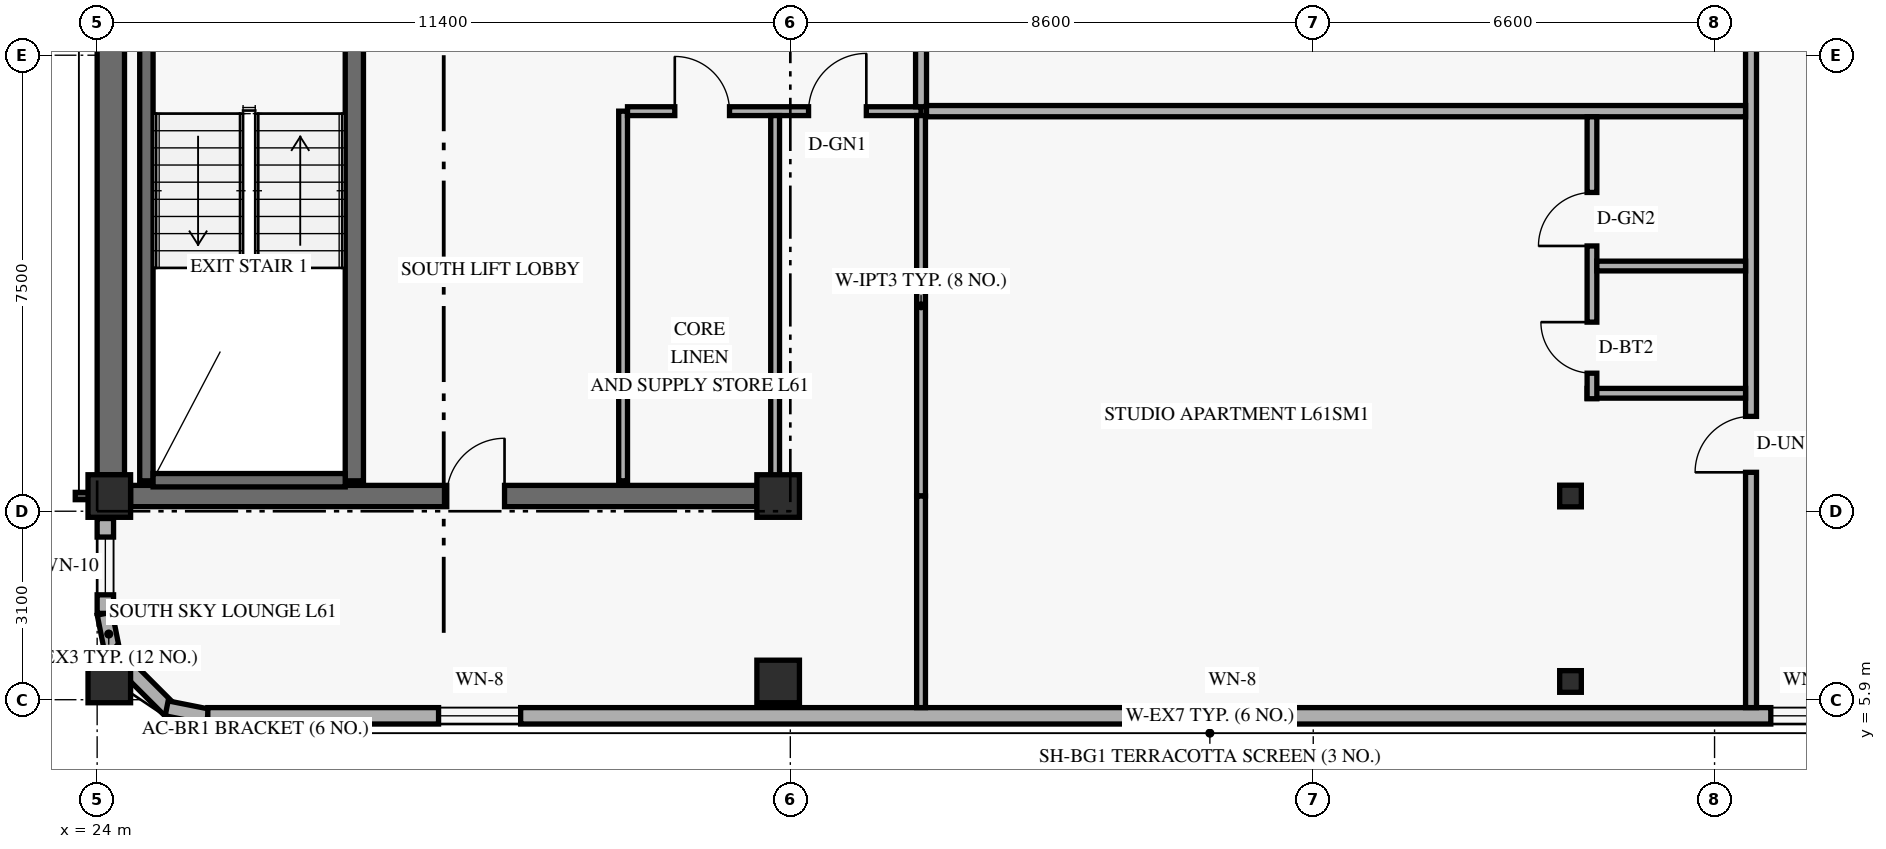
"""IFC4 building model, lengths in metres.
Left out: names, types, materials, properties, quantities, classifications, styles, units other than length and angle.
Written with IfcOpenShell. Run it as: python <this file> out.ifc"""

import sys

from ifc_helpers import new_model, si_unit, direction, frame, frame_2d, origin, origin_2d, place, context, subcontext, project, spatial, rectangle, hollow_rectangle, extrude, element, fill, save


model = new_model("IFC4")
c1 = context("Model", 3, precision=1e-05, world=origin(), true_north=direction((0.0, 1.0)))
c2 = subcontext(c1, "Body", "Model", "MODEL_VIEW")
j1 = project(units=[si_unit("LENGTHUNIT", "METRE"), si_unit("PLANEANGLEUNIT", "RADIAN")], contexts=[c1])
p1 = place(None, origin())
s1 = spatial("IfcSite", under=j1, at=p1, CompositionType="ELEMENT")
p2 = place(p1, origin())
s2 = spatial("IfcBuilding", under=s1, at=p2, CompositionType="ELEMENT")
p3 = place(p2, frame((0.0, 0.0, 235.2)))
s3 = spatial("IfcBuildingStorey", under=s2, at=p3, CompositionType="ELEMENT", Elevation=235.2)
p4 = place(p3, frame((24.225, 9.6, 0.0), z_axis=(0.0, 0.0, 1.0), x_axis=(0.0, 1.0, 0.0)))
e1 = element("IfcWall", 1, at=p4, inside=s3, PredefinedType="SHEAR", context=c2, shape_type="SweptSolid", body=[
    extrude(rectangle(XDim=7.6, YDim=0.45, at=frame_2d((3.8, 0.0))), origin(), (0.0, 0.0, 1.0), 2.821),
])
p5 = place(p3, frame((24.55, 9.25, 0.0), z_axis=(0.0, 0.0, 1.0), x_axis=(1.0, 0.0, 0.0)))
e2 = element("IfcWall", 2, at=p5, inside=s3, PredefinedType="SHEAR", context=c2, shape_type="SweptSolid", body=[
    extrude(rectangle(XDim=10.3, YDim=0.35, at=frame_2d((5.15, 0.0))), origin(), (0.0, 0.0, 1.0), 3.36),
])
p6 = place(p5, frame((5.2, 0.0, 0.0)))
e3 = element("IfcOpeningElement", 3, at=p6, cuts=e2, PredefinedType="OPENING", context=c2, shape_type="SweptSolid", body=[
    extrude(rectangle(XDim=0.95, YDim=2.15, at=frame_2d((0.475, 1.075))), frame((0.0, 0.185, 0.0), z_axis=(0.0, -1.0, 0.0), x_axis=(1.0, 0.0, 0.0)), (0.0, 0.0, 1.0), 0.37),
])
p7 = place(p3, frame((24.81, 9.5, 0.0), z_axis=(0.0, 0.0, 1.0), x_axis=(0.0, 1.0, 0.0)))
e4 = element("IfcWall", 4, at=p7, inside=s3, PredefinedType="SHEAR", context=c2, shape_type="SweptSolid", body=[
    extrude(rectangle(XDim=7.76, YDim=0.22, at=frame_2d((3.88, 0.0))), origin(), (0.0, 0.0, 1.0), 3.36),
])
p8 = place(p3, frame((28.23, 9.5, 0.0), z_axis=(0.0, 0.0, 1.0), x_axis=(0.0, 1.0, 0.0)))
e5 = element("IfcWall", 5, at=p8, inside=s3, PredefinedType="SHEAR", context=c2, shape_type="SweptSolid", body=[
    extrude(rectangle(XDim=7.76, YDim=0.3, at=frame_2d((3.88, 0.0))), origin(), (0.0, 0.0, 1.0), 3.36),
])
p9 = place(p3, frame((24.92, 9.51, 0.0), z_axis=(0.0, 0.0, 1.0), x_axis=(1.0, 0.0, 0.0)))
e6 = element("IfcWall", 6, at=p9, inside=s3, PredefinedType="SHEAR", context=c2, shape_type="SweptSolid", body=[
    extrude(rectangle(XDim=3.16, YDim=0.22, at=frame_2d((1.58, 0.0))), origin(), (0.0, 0.0, 1.0), 3.36),
])
for number, where, z_axis, x_axis in (
    (7, (24.2, 6.2, 0.0), (0.0, 0.0, 1.0), (1.0, 0.0, 0.0)),
    (8, (24.2, 9.25, 0.0), (0.0, 0.0, 1.0), (1.0, 0.0, 0.0)),
    (9, (35.2, 6.2, 0.0), (0.0, 0.0, 1.0), (1.0, 0.0, 0.0)),
    (10, (35.2, 9.25, 0.0), (0.0, 0.0, 1.0), (1.0, 0.0, 0.0)),
):
    element("IfcColumn", number, at=place(p3, frame(where, z_axis=z_axis, x_axis=x_axis)), inside=s3, PredefinedType="COLUMN", context=c2, shape_type="SweptSolid", body=[
        extrude(rectangle(XDim=0.7, YDim=0.7, at=origin_2d()), origin(), (0.0, 0.0, 1.0), 3.6),
    ])
for number, where, z_axis, x_axis in (
    (11, (48.168, 6.2, 0.0), (0.035, 0.0, 0.999), (0.0, 1.0, 0.0)),
    (12, (48.168, 9.25, 0.0), (0.035, 0.0, 0.999), (0.0, 1.0, 0.0)),
):
    element("IfcColumn", number, at=place(p3, frame(where, z_axis=z_axis, x_axis=x_axis)), inside=s3, PredefinedType="COLUMN", context=c2, shape_type="SweptSolid", body=[
        extrude(hollow_rectangle(XDim=0.356, YDim=0.356, WallThickness=0.016, at=origin_2d()), origin(), (0.0, 0.0, 1.0), 3.602),
    ])
p10 = place(p3, frame((24.124, 7.316, 0.0), z_axis=(0.0, 0.0, 1.0), x_axis=(0.194952956674, -0.980812594069, 0.0)))
e13 = element("IfcWall", 13, at=p10, inside=s3, PredefinedType="SOLIDWALL", context=c2, shape_type="SweptSolid", body=[
    extrude(rectangle(XDim=0.686, YDim=0.25, at=frame_2d((0.343, 0.0))), origin(), (0.0, 0.0, 1.0), 2.803),
])
p11 = place(p3, frame((24.231, 6.694, 0.0), z_axis=(0.0, 0.0, 1.0), x_axis=(0.707106781187, -0.707106781187, 0.0)))
e14 = element("IfcWall", 14, at=p11, inside=s3, PredefinedType="SOLIDWALL", context=c2, shape_type="SweptSolid", body=[
    extrude(rectangle(XDim=1.362, YDim=0.25, at=frame_2d((0.681, 0.0))), origin(), (0.0, 0.0, 1.0), 2.803),
])
p12 = place(p3, frame((25.143, 5.758, 0.0), z_axis=(0.0, 0.0, 1.0), x_axis=(0.980812594069, -0.194952956674, 0.0)))
e15 = element("IfcWall", 15, at=p12, inside=s3, PredefinedType="SOLIDWALL", context=c2, shape_type="SweptSolid", body=[
    extrude(rectangle(XDim=0.686, YDim=0.25, at=frame_2d((0.343, 0.0))), origin(), (0.0, 0.0, 1.0), 3.36),
])
p13 = place(p3, frame((25.82, 5.635, 0.0), z_axis=(0.0, 0.0, 1.0), x_axis=(1.0, 0.0, 0.0)))
e16 = element("IfcWall", 16, at=p13, inside=s3, PredefinedType="SOLIDWALL", context=c2, shape_type="SweptSolid", body=[
    extrude(rectangle(XDim=32.96, YDim=0.27, at=frame_2d((16.48, 0.0))), origin(), (0.0, 0.0, 1.0), 3.36),
])
p14 = place(p13, frame((3.795, 0.0, 0.85)))
e17 = element("IfcOpeningElement", 17, at=p14, cuts=e16, PredefinedType="OPENING", context=c2, shape_type="SweptSolid", body=[
    extrude(rectangle(XDim=1.35, YDim=1.55, at=frame_2d((0.675, 0.775))), frame((0.0, 0.145, 0.0), z_axis=(0.0, -1.0, 0.0), x_axis=(1.0, 0.0, 0.0)), (0.0, 0.0, 1.0), 0.29),
])
p15 = place(p13, frame((16.176, 0.0, 0.85)))
e18 = element("IfcOpeningElement", 18, at=p15, cuts=e16, PredefinedType="OPENING", context=c2, shape_type="SweptSolid", body=[
    extrude(rectangle(XDim=1.35, YDim=1.55, at=frame_2d((0.675, 0.775))), frame((0.0, 0.145, 0.0), z_axis=(0.0, -1.0, 0.0), x_axis=(1.0, 0.0, 0.0)), (0.0, 0.0, 1.0), 0.29),
])
p16 = place(p13, frame((25.705, 0.0, 0.85)))
e19 = element("IfcOpeningElement", 19, at=p16, cuts=e16, PredefinedType="OPENING", context=c2, shape_type="SweptSolid", body=[
    extrude(rectangle(XDim=1.2, YDim=1.5, at=frame_2d((0.6, 0.75))), frame((0.0, 0.145, 0.0), z_axis=(0.0, -1.0, 0.0), x_axis=(1.0, 0.0, 0.0)), (0.0, 0.0, 1.0), 0.29),
])
p17 = place(p13, frame((28.011, 0.0, 0.85)))
e20 = element("IfcOpeningElement", 20, at=p17, cuts=e16, PredefinedType="OPENING", context=c2, shape_type="SweptSolid", body=[
    extrude(rectangle(XDim=1.35, YDim=1.55, at=frame_2d((0.675, 0.775))), frame((0.0, 0.145, 0.0), z_axis=(0.0, -1.0, 0.0), x_axis=(1.0, 0.0, 0.0)), (0.0, 0.0, 1.0), 0.29),
])
p18 = place(p3, frame((24.135, 7.32, 0.0), z_axis=(0.0, 0.0, 1.0), x_axis=(0.0, 1.0, 0.0)))
e21 = element("IfcWall", 21, at=p18, inside=s3, PredefinedType="SOLIDWALL", context=c2, shape_type="SweptSolid", body=[
    extrude(rectangle(XDim=1.56, YDim=0.27, at=frame_2d((0.78, 0.0))), origin(), (0.0, 0.0, 1.0), 2.803),
])
p19 = place(p18, frame((0.305, 0.0, 0.85)))
e22 = element("IfcOpeningElement", 22, at=p19, cuts=e21, PredefinedType="OPENING", context=c2, shape_type="SweptSolid", body=[
    extrude(rectangle(XDim=0.95, YDim=1.5, at=frame_2d((0.475, 0.75))), frame((0.0, 0.145, 0.0), z_axis=(0.0, -1.0, 0.0), x_axis=(1.0, 0.0, 0.0)), (0.0, 0.0, 1.0), 0.29),
])
p20 = place(p3, frame((32.65, 9.5, 0.0), z_axis=(0.0, 0.0, 1.0), x_axis=(0.0, 1.0, 0.0)))
e23 = element("IfcWall", 23, at=p20, inside=s3, PredefinedType="PARTITIONING", context=c2, shape_type="SweptSolid", body=[
    extrude(rectangle(XDim=6.08, YDim=0.145, at=frame_2d((3.04, 0.0))), origin(), (0.0, 0.0, 1.0), 3.36),
])
p21 = place(p3, frame((32.722, 15.58, 0.0), z_axis=(0.0, 0.0, 1.0), x_axis=(1.0, 0.0, 0.0)))
e24 = element("IfcWall", 24, at=p21, inside=s3, PredefinedType="PARTITIONING", context=c2, shape_type="SweptSolid", body=[
    extrude(rectangle(XDim=4.828, YDim=0.145, at=frame_2d((2.414, 0.0))), origin(), (0.0, 0.0, 1.0), 2.803),
])
p22 = place(p21, frame((0.778, 0.0, 0.0)))
e25 = element("IfcOpeningElement", 25, at=p22, cuts=e24, PredefinedType="OPENING", context=c2, shape_type="SweptSolid", body=[
    extrude(rectangle(XDim=0.9, YDim=2.1, at=frame_2d((0.45, 1.05))), frame((0.0, 0.083, 0.0), z_axis=(0.0, -1.0, 0.0), x_axis=(1.0, 0.0, 0.0)), (0.0, 0.0, 1.0), 0.165),
])
p23 = place(p21, frame((2.978, 0.0, 0.0)))
e26 = element("IfcOpeningElement", 26, at=p23, cuts=e24, PredefinedType="OPENING", context=c2, shape_type="SweptSolid", body=[
    extrude(rectangle(XDim=0.95, YDim=2.15, at=frame_2d((0.475, 1.075))), frame((0.0, 0.083, 0.0), z_axis=(0.0, -1.0, 0.0), x_axis=(1.0, 0.0, 0.0)), (0.0, 0.0, 1.0), 0.165),
])
p24 = place(p3, frame((37.55, 9.25, 0.0), z_axis=(0.0, 0.0, 1.0), x_axis=(0.0, 1.0, 0.0)))
e27 = element("IfcWall", 27, at=p24, inside=s3, PredefinedType="PARTITIONING", context=c2, shape_type="SweptSolid", body=[
    extrude(rectangle(XDim=6.258, YDim=0.145, at=frame_2d((3.129, 0.0))), origin(), (0.0, 0.0, 1.0), 2.803),
])
p25 = place(p3, frame((35.15, 9.5, 0.0), z_axis=(0.0, 0.0, 1.0), x_axis=(0.0, 1.0, 0.0)))
e28 = element("IfcWall", 28, at=p25, inside=s3, PredefinedType="PARTITIONING", context=c2, shape_type="SweptSolid", body=[
    extrude(rectangle(XDim=6.008, YDim=0.145, at=frame_2d((3.004, 0.0))), origin(), (0.0, 0.0, 1.0), 2.803),
])
p26 = place(p3, frame((37.55, 15.653, 0.0), z_axis=(0.0, 0.0, 1.0), x_axis=(0.0, 1.0, 0.0)))
e29 = element("IfcWall", 29, at=p26, inside=s3, PredefinedType="STANDARD", context=c2, shape_type="SweptSolid", body=[
    extrude(rectangle(XDim=3.147, YDim=0.18, at=frame_2d((1.574, 0.0))), origin(), (0.0, 0.0, 1.0), 2.803),
])
p27 = place(p3, frame((51.2, 5.77, 0.0), z_axis=(0.0, 0.0, 1.0), x_axis=(0.0, 1.0, 0.0)))
e30 = element("IfcWall", 30, at=p27, inside=s3, PredefinedType="STANDARD", context=c2, shape_type="SweptSolid", body=[
    extrude(rectangle(XDim=13.03, YDim=0.18, at=frame_2d((6.515, 0.0))), origin(), (0.0, 0.0, 1.0), 2.803),
])
p28 = place(p27, frame((3.87, 0.0, 0.0)))
e31 = element("IfcOpeningElement", 31, at=p28, cuts=e30, PredefinedType="OPENING", context=c2, shape_type="SweptSolid", body=[
    extrude(rectangle(XDim=0.92, YDim=2.15, at=frame_2d((0.46, 1.075))), frame((0.0, 0.1, 0.0), z_axis=(0.0, -1.0, 0.0), x_axis=(1.0, 0.0, 0.0)), (0.0, 0.0, 1.0), 0.2),
])
p29 = place(p3, frame((37.55, 5.77, 0.0), z_axis=(0.0, 0.0, 1.0), x_axis=(0.0, 1.0, 0.0)))
e32 = element("IfcWall", 32, at=p29, inside=s3, PredefinedType="PARTITIONING", context=c2, shape_type="SweptSolid", body=[
    extrude(rectangle(XDim=3.48, YDim=0.145, at=frame_2d((1.74, 0.0))), origin(), (0.0, 0.0, 1.0), 2.803),
])
p30 = place(p3, frame((37.64, 15.58, 0.0), z_axis=(0.0, 0.0, 1.0), x_axis=(1.0, 0.0, 0.0)))
e33 = element("IfcWall", 33, at=p30, inside=s3, PredefinedType="PARTITIONING", context=c2, shape_type="SweptSolid", body=[
    extrude(rectangle(XDim=13.47, YDim=0.185, at=frame_2d((6.735, 0.0))), origin(), (0.0, 0.0, 1.0), 2.803),
])
p31 = place(p3, frame((48.504, 10.94, 0.0), z_axis=(0.0, 0.0, 1.0), x_axis=(1.0, 0.0, 0.0)))
e34 = element("IfcWall", 34, at=p31, inside=s3, PredefinedType="PLUMBINGWALL", context=c2, shape_type="SweptSolid", body=[
    extrude(rectangle(XDim=2.606, YDim=0.16, at=frame_2d((1.303, 0.0))), origin(), (0.0, 0.0, 1.0), 3.36),
])
p32 = place(p3, frame((48.584, 10.85, 0.0), z_axis=(0.0, 0.0, 1.0), x_axis=(0.0, 1.0, 0.0)))
e35 = element("IfcWall", 35, at=p32, inside=s3, PredefinedType="PLUMBINGWALL", context=c2, shape_type="SweptSolid", body=[
    extrude(rectangle(XDim=4.637, YDim=0.16, at=frame_2d((2.319, 0.0))), origin(), (0.0, 0.0, 1.0), 3.039),
])
p33 = place(p32, frame((0.42, 0.0, 0.0)))
e36 = element("IfcOpeningElement", 36, at=p33, cuts=e35, PredefinedType="OPENING", context=c2, shape_type="SweptSolid", body=[
    extrude(rectangle(XDim=0.84, YDim=2.12, at=frame_2d((0.42, 1.06))), frame((0.0, 0.09, 0.0), z_axis=(0.0, -1.0, 0.0), x_axis=(1.0, 0.0, 0.0)), (0.0, 0.0, 1.0), 0.18),
])
p34 = place(p32, frame((2.513, 0.0, 0.0)))
e37 = element("IfcOpeningElement", 37, at=p34, cuts=e35, PredefinedType="OPENING", context=c2, shape_type="SweptSolid", body=[
    extrude(rectangle(XDim=0.88, YDim=2.12, at=frame_2d((0.44, 1.06))), frame((0.0, 0.09, 0.0), z_axis=(0.0, -1.0, 0.0), x_axis=(1.0, 0.0, 0.0)), (0.0, 0.0, 1.0), 0.18),
])
p35 = place(p3, frame((48.664, 13.033, 0.0), z_axis=(0.0, 0.0, 1.0), x_axis=(1.0, 0.0, 0.0)))
e38 = element("IfcWall", 38, at=p35, inside=s3, PredefinedType="PLUMBINGWALL", context=c2, shape_type="SweptSolid", body=[
    extrude(rectangle(XDim=2.446, YDim=0.16, at=frame_2d((1.223, 0.0))), origin(), (0.0, 0.0, 1.0), 3.36),
])
p36 = place(p14, origin())
e39 = element("IfcWindow", 39, at=p36, inside=s3, PartitioningType="SINGLE_PANEL", PredefinedType="WINDOW", context=c2, shape_type="SweptSolid", body=[
    extrude(rectangle(XDim=1.35, YDim=1.55, at=frame_2d((0.675, 0.775))), frame((0.0, 0.03, 0.0), z_axis=(0.0, -1.0, 0.0), x_axis=(1.0, 0.0, 0.0)), (0.0, 0.0, 1.0), 0.06),
])
fill(e17, e39)
p37 = place(p15, origin())
e40 = element("IfcWindow", 40, at=p37, inside=s3, PartitioningType="SINGLE_PANEL", PredefinedType="WINDOW", context=c2, shape_type="SweptSolid", body=[
    extrude(rectangle(XDim=1.35, YDim=1.55, at=frame_2d((0.675, 0.775))), frame((0.0, 0.03, 0.0), z_axis=(0.0, -1.0, 0.0), x_axis=(1.0, 0.0, 0.0)), (0.0, 0.0, 1.0), 0.06),
])
fill(e18, e40)
p38 = place(p16, origin())
e41 = element("IfcWindow", 41, at=p38, inside=s3, PartitioningType="SINGLE_PANEL", PredefinedType="WINDOW", context=c2, shape_type="SweptSolid", body=[
    extrude(rectangle(XDim=1.2, YDim=1.5, at=frame_2d((0.6, 0.75))), frame((0.0, 0.03, 0.0), z_axis=(0.0, -1.0, 0.0), x_axis=(1.0, 0.0, 0.0)), (0.0, 0.0, 1.0), 0.06),
])
fill(e19, e41)
p39 = place(p19, origin())
e42 = element("IfcWindow", 42, at=p39, inside=s3, PartitioningType="SINGLE_PANEL", PredefinedType="WINDOW", context=c2, shape_type="SweptSolid", body=[
    extrude(rectangle(XDim=0.95, YDim=1.5, at=frame_2d((0.475, 0.75))), frame((0.0, 0.03, 0.0), z_axis=(0.0, -1.0, 0.0), x_axis=(1.0, 0.0, 0.0)), (0.0, 0.0, 1.0), 0.06),
])
fill(e22, e42)
p40 = place(p22, origin())
e43 = element("IfcDoor", 43, at=p40, inside=s3, OperationType="SINGLE_SWING_LEFT", PredefinedType="DOOR", context=c2, shape_type="SweptSolid", body=[
    extrude(rectangle(XDim=0.9, YDim=2.1, at=frame_2d((0.45, 1.05))), frame((0.0, 0.025, 0.0), z_axis=(0.0, -1.0, 0.0), x_axis=(1.0, 0.0, 0.0)), (0.0, 0.0, 1.0), 0.05),
])
fill(e25, e43)
p41 = place(p23, origin())
e44 = element("IfcDoor", 44, at=p41, inside=s3, OperationType="SINGLE_SWING_RIGHT", PredefinedType="DOOR", context=c2, shape_type="SweptSolid", body=[
    extrude(rectangle(XDim=0.95, YDim=2.15, at=frame_2d((0.475, 1.075))), frame((0.0, 0.025, 0.0), z_axis=(0.0, -1.0, 0.0), x_axis=(1.0, 0.0, 0.0)), (0.0, 0.0, 1.0), 0.05),
])
fill(e26, e44)
p42 = place(p6, frame((0.95, 0.0, 0.0), z_axis=(0.0, 0.0, 1.0), x_axis=(-1.0, 0.0, 0.0)))
e45 = element("IfcDoor", 45, at=p42, inside=s3, OperationType="SINGLE_SWING_LEFT", PredefinedType="DOOR", context=c2, shape_type="SweptSolid", body=[
    extrude(rectangle(XDim=0.95, YDim=2.15, at=frame_2d((0.475, 1.075))), frame((0.0, 0.025, 0.0), z_axis=(0.0, -1.0, 0.0), x_axis=(1.0, 0.0, 0.0)), (0.0, 0.0, 1.0), 0.05),
])
fill(e3, e45)
p43 = place(p28, origin())
e46 = element("IfcDoor", 46, at=p43, inside=s3, OperationType="SINGLE_SWING_LEFT", PredefinedType="DOOR", context=c2, shape_type="SweptSolid", body=[
    extrude(rectangle(XDim=0.92, YDim=2.15, at=frame_2d((0.46, 1.075))), frame((0.0, 0.025, 0.0), z_axis=(0.0, -1.0, 0.0), x_axis=(1.0, 0.0, 0.0)), (0.0, 0.0, 1.0), 0.05),
])
fill(e31, e46)
p44 = place(p33, origin())
e47 = element("IfcDoor", 47, at=p44, inside=s3, OperationType="SINGLE_SWING_RIGHT", PredefinedType="DOOR", context=c2, shape_type="SweptSolid", body=[
    extrude(rectangle(XDim=0.84, YDim=2.12, at=frame_2d((0.42, 1.06))), frame((0.0, 0.025, 0.0), z_axis=(0.0, -1.0, 0.0), x_axis=(1.0, 0.0, 0.0)), (0.0, 0.0, 1.0), 0.05),
])
fill(e36, e47)
p45 = place(p34, origin())
e48 = element("IfcDoor", 48, at=p45, inside=s3, OperationType="SINGLE_SWING_LEFT", PredefinedType="DOOR", context=c2, shape_type="SweptSolid", body=[
    extrude(rectangle(XDim=0.88, YDim=2.12, at=frame_2d((0.44, 1.06))), frame((0.0, 0.025, 0.0), z_axis=(0.0, -1.0, 0.0), x_axis=(1.0, 0.0, 0.0)), (0.0, 0.0, 1.0), 0.05),
])
fill(e37, e48)
save(model, sys.argv[1])
